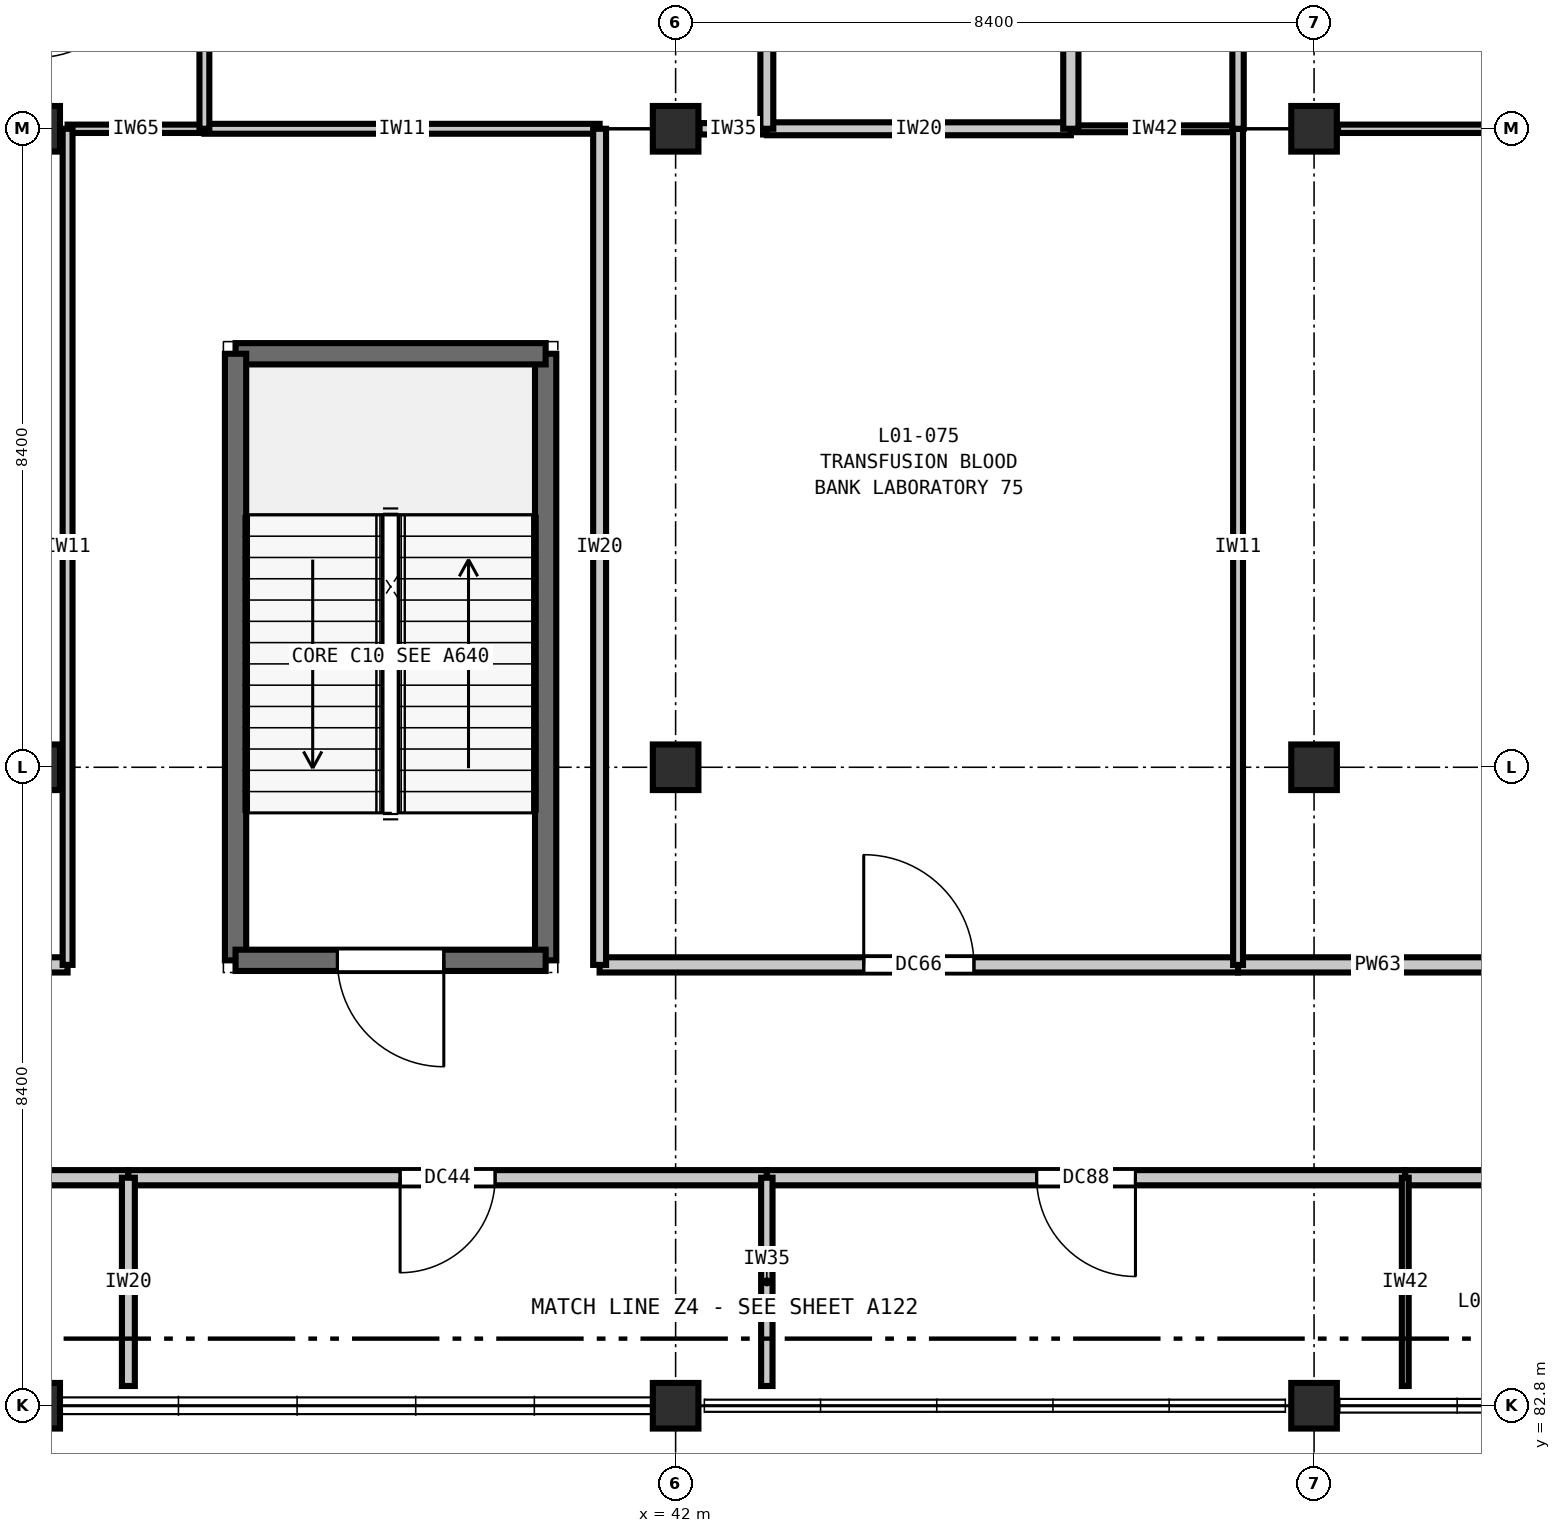
"""IFC4 building model, lengths in metres.
Left out: names, types, materials, properties, quantities, classifications, styles, units other than length and angle.
Written with IfcOpenShell. Run it as: python <this file> out.ifc"""

import sys

from ifc_helpers import new_model, si_unit, direction, frame, frame_2d, origin, origin_2d, place, context, subcontext, project, spatial, rectangle, extrude, element, fill, save


model = new_model("IFC4")
c1 = context("Model", 3, precision=1e-05, world=origin(), true_north=direction((0.0, 1.0)))
c2 = subcontext(c1, "Body", "Model", "MODEL_VIEW")
j1 = project(units=[si_unit("LENGTHUNIT", "METRE"), si_unit("PLANEANGLEUNIT", "RADIAN")], contexts=[c1])
p1 = place(None, origin())
s1 = spatial("IfcSite", under=j1, at=p1, CompositionType="ELEMENT")
p2 = place(p1, origin())
s2 = spatial("IfcBuilding", under=s1, at=p2, CompositionType="ELEMENT")
p3 = place(p2, frame((0.0, 0.0, 5.4)))
s3 = spatial("IfcBuildingStorey", under=s2, at=p3, CompositionType="ELEMENT", Elevation=5.4)
for number, where, z_axis, x_axis in (
    (1, (33.6, 82.8, 0.0), (0.0, 0.0, 1.0), (1.0, 0.0, 0.0)),
    (2, (33.6, 91.2, 0.0), (0.0, 0.0, 1.0), (1.0, 0.0, 0.0)),
    (3, (33.6, 99.6, 0.0), (0.0, 0.0, 1.0), (1.0, 0.0, 0.0)),
    (4, (42.0, 82.8, 0.0), (0.0, 0.0, 1.0), (1.0, 0.0, 0.0)),
    (5, (42.0, 91.2, 0.0), (0.0, 0.0, 1.0), (1.0, 0.0, 0.0)),
    (6, (42.0, 99.6, 0.0), (0.0, 0.0, 1.0), (1.0, 0.0, 0.0)),
    (7, (50.4, 82.8, 0.0), (0.0, 0.0, 1.0), (1.0, 0.0, 0.0)),
    (8, (50.4, 91.2, 0.0), (0.0, 0.0, 1.0), (1.0, 0.0, 0.0)),
    (9, (50.4, 99.6, 0.0), (0.0, 0.0, 1.0), (1.0, 0.0, 0.0)),
):
    element("IfcColumn", number, at=place(p3, frame(where, z_axis=z_axis, x_axis=x_axis)), inside=s3, PredefinedType="COLUMN", context=c2, shape_type="SweptSolid", body=[
        extrude(rectangle(XDim=0.6, YDim=0.6, at=origin_2d()), origin(), (0.0, 0.0, 1.0), 5.4),
    ])
p4 = place(p3, frame((40.29, 88.66, 0.0), z_axis=(0.0, 0.0, 1.0), x_axis=(0.0, 1.0, 0.0)))
e10 = element("IfcWall", 10, at=p4, inside=s3, PredefinedType="SHEAR", context=c2, shape_type="SweptSolid", body=[
    extrude(rectangle(XDim=7.98, YDim=0.28, at=frame_2d((3.99, 0.0))), origin(), (0.0, 0.0, 1.0), 5.4),
])
p5 = place(p3, frame((40.29, 96.64, 0.0), z_axis=(0.0, 0.0, 1.0), x_axis=(-1.0, 0.0, 0.0)))
e11 = element("IfcWall", 11, at=p5, inside=s3, PredefinedType="SHEAR", context=c2, shape_type="SweptSolid", body=[
    extrude(rectangle(XDim=4.08, YDim=0.28, at=frame_2d((2.04, 0.0))), origin(), (0.0, 0.0, 1.0), 5.4),
])
p6 = place(p3, frame((36.21, 96.64, 0.0), z_axis=(0.0, 0.0, 1.0), x_axis=(0.0, -1.0, 0.0)))
e12 = element("IfcWall", 12, at=p6, inside=s3, PredefinedType="SHEAR", context=c2, shape_type="SweptSolid", body=[
    extrude(rectangle(XDim=7.98, YDim=0.28, at=frame_2d((3.99, 0.0))), origin(), (0.0, 0.0, 1.0), 5.4),
])
p7 = place(p3, frame((36.21, 88.66, 0.0), z_axis=(0.0, 0.0, 1.0), x_axis=(1.0, 0.0, 0.0)))
e13 = element("IfcWall", 13, at=p7, inside=s3, PredefinedType="SHEAR", context=c2, shape_type="SweptSolid", body=[
    extrude(rectangle(XDim=4.08, YDim=0.28, at=frame_2d((2.04, 0.0))), origin(), (0.0, 0.0, 1.0), 5.4),
])
p8 = place(p7, frame((1.34, 0.0, 0.0)))
e14 = element("IfcOpeningElement", 14, at=p8, cuts=e13, PredefinedType="OPENING", context=c2, shape_type="SweptSolid", body=[
    extrude(rectangle(XDim=1.4, YDim=2.2, at=frame_2d((0.7, 1.1))), frame((0.0, 0.15, 0.0), z_axis=(0.0, -1.0, 0.0), x_axis=(1.0, 0.0, 0.0)), (0.0, 0.0, 1.0), 0.3),
])
p9 = place(p3, frame((25.2, 85.8, 0.0), z_axis=(0.0, 0.0, 1.0), x_axis=(1.0, 0.0, 0.0)))
e15 = element("IfcWall", 15, at=p9, inside=s3, PredefinedType="PARTITIONING", context=c2, shape_type="SweptSolid", body=[
    extrude(rectangle(XDim=9.6, YDim=0.2, at=frame_2d((4.8, 0.0))), origin(), (0.0, 0.0, 1.0), 5.05),
])
p10 = place(p9, frame((3.875, 0.0, 0.0)))
e16 = element("IfcOpeningElement", 16, at=p10, cuts=e15, PredefinedType="OPENING", context=c2, shape_type="SweptSolid", body=[
    extrude(rectangle(XDim=1.85, YDim=2.3, at=frame_2d((0.925, 1.15))), frame((0.0, 0.11, 0.0), z_axis=(0.0, -1.0, 0.0), x_axis=(1.0, 0.0, 0.0)), (0.0, 0.0, 1.0), 0.22),
])
p11 = place(p3, frame((34.8, 85.8, 0.0), z_axis=(0.0, 0.0, 1.0), x_axis=(1.0, 0.0, 0.0)))
e17 = element("IfcWall", 17, at=p11, inside=s3, PredefinedType="PARTITIONING", context=c2, shape_type="SweptSolid", body=[
    extrude(rectangle(XDim=8.4, YDim=0.2, at=frame_2d((4.2, 0.0))), origin(), (0.0, 0.0, 1.0), 5.05),
])
p12 = place(p11, frame((3.575, 0.0, 0.0)))
e18 = element("IfcOpeningElement", 18, at=p12, cuts=e17, PredefinedType="OPENING", context=c2, shape_type="SweptSolid", body=[
    extrude(rectangle(XDim=1.25, YDim=2.15, at=frame_2d((0.625, 1.075))), frame((0.0, 0.11, 0.0), z_axis=(0.0, -1.0, 0.0), x_axis=(1.0, 0.0, 0.0)), (0.0, 0.0, 1.0), 0.22),
])
p13 = place(p3, frame((43.2, 85.8, 0.0), z_axis=(0.0, 0.0, 1.0), x_axis=(1.0, 0.0, 0.0)))
e19 = element("IfcWall", 19, at=p13, inside=s3, PredefinedType="PARTITIONING", context=c2, shape_type="SweptSolid", body=[
    extrude(rectangle(XDim=8.4, YDim=0.2, at=frame_2d((4.2, 0.0))), origin(), (0.0, 0.0, 1.0), 5.05),
])
p14 = place(p13, frame((3.55, 0.0, 0.0)))
e20 = element("IfcOpeningElement", 20, at=p14, cuts=e19, PredefinedType="OPENING", context=c2, shape_type="SweptSolid", body=[
    extrude(rectangle(XDim=1.3, YDim=2.2, at=frame_2d((0.65, 1.1))), frame((0.0, 0.11, 0.0), z_axis=(0.0, -1.0, 0.0), x_axis=(1.0, 0.0, 0.0)), (0.0, 0.0, 1.0), 0.22),
])
p15 = place(p3, frame((51.6, 85.8, 0.0), z_axis=(0.0, 0.0, 1.0), x_axis=(1.0, 0.0, 0.0)))
e21 = element("IfcWall", 21, at=p15, inside=s3, PredefinedType="PARTITIONING", context=c2, shape_type="SweptSolid", body=[
    extrude(rectangle(XDim=7.2, YDim=0.2, at=frame_2d((3.6, 0.0))), origin(), (0.0, 0.0, 1.0), 5.05),
])
p16 = place(p15, frame((2.925, 0.0, 0.0)))
e22 = element("IfcOpeningElement", 22, at=p16, cuts=e21, PredefinedType="OPENING", context=c2, shape_type="SweptSolid", body=[
    extrude(rectangle(XDim=1.35, YDim=2.2, at=frame_2d((0.675, 1.1))), frame((0.0, 0.11, 0.0), z_axis=(0.0, -1.0, 0.0), x_axis=(1.0, 0.0, 0.0)), (0.0, 0.0, 1.0), 0.22),
])
p17 = place(p3, frame((25.6, 88.6, 0.0), z_axis=(0.0, 0.0, 1.0), x_axis=(1.0, 0.0, 0.0)))
e23 = element("IfcWall", 23, at=p17, inside=s3, PredefinedType="PARTITIONING", context=c2, shape_type="SweptSolid", body=[
    extrude(rectangle(XDim=8.4, YDim=0.2, at=frame_2d((4.2, 0.0))), origin(), (0.0, 0.0, 1.0), 5.05),
])
p18 = place(p17, frame((3.525, 0.0, 0.0)))
e24 = element("IfcOpeningElement", 24, at=p18, cuts=e23, PredefinedType="OPENING", context=c2, shape_type="SweptSolid", body=[
    extrude(rectangle(XDim=1.35, YDim=2.2, at=frame_2d((0.675, 1.1))), frame((0.0, 0.11, 0.0), z_axis=(0.0, -1.0, 0.0), x_axis=(1.0, 0.0, 0.0)), (0.0, 0.0, 1.0), 0.22),
])
p19 = place(p3, frame((41.0, 88.6, 0.0), z_axis=(0.0, 0.0, 1.0), x_axis=(1.0, 0.0, 0.0)))
e25 = element("IfcWall", 25, at=p19, inside=s3, PredefinedType="PARTITIONING", context=c2, shape_type="SweptSolid", body=[
    extrude(rectangle(XDim=8.4, YDim=0.2, at=frame_2d((4.2, 0.0))), origin(), (0.0, 0.0, 1.0), 5.05),
])
p20 = place(p19, frame((3.475, 0.0, 0.0)))
e26 = element("IfcOpeningElement", 26, at=p20, cuts=e25, PredefinedType="OPENING", context=c2, shape_type="SweptSolid", body=[
    extrude(rectangle(XDim=1.45, YDim=2.25, at=frame_2d((0.725, 1.125))), frame((0.0, 0.11, 0.0), z_axis=(0.0, -1.0, 0.0), x_axis=(1.0, 0.0, 0.0)), (0.0, 0.0, 1.0), 0.22),
])
p21 = place(p3, frame((49.4, 88.6, 0.0), z_axis=(0.0, 0.0, 1.0), x_axis=(1.0, 0.0, 0.0)))
e27 = element("IfcWall", 27, at=p21, inside=s3, PredefinedType="PARTITIONING", context=c2, shape_type="SweptSolid", body=[
    extrude(rectangle(XDim=9.4, YDim=0.2, at=frame_2d((4.7, 0.0))), origin(), (0.0, 0.0, 1.0), 5.05),
])
p22 = place(p21, frame((3.925, 0.0, 0.0)))
e28 = element("IfcOpeningElement", 28, at=p22, cuts=e27, PredefinedType="OPENING", context=c2, shape_type="SweptSolid", body=[
    extrude(rectangle(XDim=1.55, YDim=2.25, at=frame_2d((0.775, 1.125))), frame((0.0, 0.11, 0.0), z_axis=(0.0, -1.0, 0.0), x_axis=(1.0, 0.0, 0.0)), (0.0, 0.0, 1.0), 0.22),
])
p23 = place(p3, frame((34.0, 99.6, 0.0), z_axis=(0.0, 0.0, 1.0), x_axis=(1.0, 0.0, 0.0)))
e29 = element("IfcWall", 29, at=p23, inside=s3, PredefinedType="PARTITIONING", context=c2, shape_type="SweptSolid", body=[
    extrude(rectangle(XDim=1.8, YDim=0.11, at=frame_2d((0.9, 0.0))), origin(), (0.0, 0.0, 1.0), 4.685),
])
p24 = place(p3, frame((35.8, 99.6, 0.0), z_axis=(0.0, 0.0, 1.0), x_axis=(1.0, 0.0, 0.0)))
e30 = element("IfcWall", 30, at=p24, inside=s3, PredefinedType="PARTITIONING", context=c2, shape_type="SweptSolid", body=[
    extrude(rectangle(XDim=5.2, YDim=0.13, at=frame_2d((2.6, 0.0))), origin(), (0.0, 0.0, 1.0), 4.685),
])
p25 = place(p3, frame((42.315, 99.6, 0.0), z_axis=(0.0, 0.0, 1.0), x_axis=(1.0, 0.0, 0.0)))
e31 = element("IfcWall", 31, at=p25, inside=s3, PredefinedType="PARTITIONING", context=c2, shape_type="SweptSolid", body=[
    extrude(rectangle(XDim=0.885, YDim=0.15, at=frame_2d((0.442, 0.0))), origin(), (0.0, 0.0, 1.0), 4.685),
])
p26 = place(p3, frame((43.2, 99.6, 0.0), z_axis=(0.0, 0.0, 1.0), x_axis=(1.0, 0.0, 0.0)))
e32 = element("IfcWall", 32, at=p26, inside=s3, PredefinedType="PARTITIONING", context=c2, shape_type="SweptSolid", body=[
    extrude(rectangle(XDim=4.0, YDim=0.17, at=frame_2d((2.0, 0.0))), origin(), (0.0, 0.0, 1.0), 4.685),
])
p27 = place(p3, frame((47.2, 99.6, 0.0), z_axis=(0.0, 0.0, 1.0), x_axis=(1.0, 0.0, 0.0)))
e33 = element("IfcWall", 33, at=p27, inside=s3, PredefinedType="PARTITIONING", context=c2, shape_type="SweptSolid", body=[
    extrude(rectangle(XDim=2.2, YDim=0.09, at=frame_2d((1.1, 0.0))), origin(), (0.0, 0.0, 1.0), 4.685),
])
p28 = place(p3, frame((50.715, 99.6, 0.0), z_axis=(0.0, 0.0, 1.0), x_axis=(1.0, 0.0, 0.0)))
e34 = element("IfcWall", 34, at=p28, inside=s3, PredefinedType="PARTITIONING", context=c2, shape_type="SweptSolid", body=[
    extrude(rectangle(XDim=6.085, YDim=0.11, at=frame_2d((3.042, 0.0))), origin(), (0.0, 0.0, 1.0), 4.685),
])
p29 = place(p3, frame((34.0, 88.6, 0.0), z_axis=(0.0, 0.0, 1.0), x_axis=(0.0, 1.0, 0.0)))
e35 = element("IfcWall", 35, at=p29, inside=s3, PredefinedType="PARTITIONING", context=c2, shape_type="SweptSolid", body=[
    extrude(rectangle(XDim=11.0, YDim=0.13, at=frame_2d((5.5, 0.0))), origin(), (0.0, 0.0, 1.0), 5.05),
])
p30 = place(p3, frame((34.8, 83.06, 0.0), z_axis=(0.0, 0.0, 1.0), x_axis=(0.0, 1.0, 0.0)))
e36 = element("IfcWall", 36, at=p30, inside=s3, PredefinedType="PARTITIONING", context=c2, shape_type="SweptSolid", body=[
    extrude(rectangle(XDim=2.74, YDim=0.17, at=frame_2d((1.37, 0.0))), origin(), (0.0, 0.0, 1.0), 5.05),
])
p31 = place(p3, frame((35.8, 99.6, 0.0), z_axis=(0.0, 0.0, 1.0), x_axis=(0.0, 1.0, 0.0)))
e37 = element("IfcWall", 37, at=p31, inside=s3, PredefinedType="PARTITIONING", context=c2, shape_type="SweptSolid", body=[
    extrude(rectangle(XDim=6.8, YDim=0.13, at=frame_2d((3.4, 0.0))), origin(), (0.0, 0.0, 1.0), 5.05),
])
p32 = place(p3, frame((41.0, 88.6, 0.0), z_axis=(0.0, 0.0, 1.0), x_axis=(0.0, 1.0, 0.0)))
e38 = element("IfcWall", 38, at=p32, inside=s3, PredefinedType="PARTITIONING", context=c2, shape_type="SweptSolid", body=[
    extrude(rectangle(XDim=11.0, YDim=0.17, at=frame_2d((5.5, 0.0))), origin(), (0.0, 0.0, 1.0), 5.05),
])
p33 = place(p3, frame((43.2, 83.06, 0.0), z_axis=(0.0, 0.0, 1.0), x_axis=(0.0, 1.0, 0.0)))
e39 = element("IfcWall", 39, at=p33, inside=s3, PredefinedType="PARTITIONING", context=c2, shape_type="SweptSolid", body=[
    extrude(rectangle(XDim=2.74, YDim=0.15, at=frame_2d((1.37, 0.0))), origin(), (0.0, 0.0, 1.0), 5.05),
])
p34 = place(p3, frame((43.2, 99.6, 0.0), z_axis=(0.0, 0.0, 1.0), x_axis=(0.0, 1.0, 0.0)))
e40 = element("IfcWall", 40, at=p34, inside=s3, PredefinedType="PARTITIONING", context=c2, shape_type="SweptSolid", body=[
    extrude(rectangle(XDim=13.6, YDim=0.17, at=frame_2d((6.8, 0.0))), origin(), (0.0, 0.0, 1.0), 5.05),
])
p35 = place(p3, frame((47.2, 99.6, 0.0), z_axis=(0.0, 0.0, 1.0), x_axis=(0.0, 1.0, 0.0)))
e41 = element("IfcWall", 41, at=p35, inside=s3, PredefinedType="PARTITIONING", context=c2, shape_type="SweptSolid", body=[
    extrude(rectangle(XDim=6.8, YDim=0.2, at=frame_2d((3.4, 0.0))), origin(), (0.0, 0.0, 1.0), 5.05),
])
p36 = place(p35, frame((2.55, 0.0, 0.0)))
e42 = element("IfcOpeningElement", 42, at=p36, cuts=e41, PredefinedType="OPENING", context=c2, shape_type="SweptSolid", body=[
    extrude(rectangle(XDim=1.7, YDim=2.3, at=frame_2d((0.85, 1.15))), frame((0.0, 0.11, 0.0), z_axis=(0.0, -1.0, 0.0), x_axis=(1.0, 0.0, 0.0)), (0.0, 0.0, 1.0), 0.22),
])
p37 = place(p3, frame((49.4, 88.6, 0.0), z_axis=(0.0, 0.0, 1.0), x_axis=(0.0, 1.0, 0.0)))
e43 = element("IfcWall", 43, at=p37, inside=s3, PredefinedType="PARTITIONING", context=c2, shape_type="SweptSolid", body=[
    extrude(rectangle(XDim=11.0, YDim=0.13, at=frame_2d((5.5, 0.0))), origin(), (0.0, 0.0, 1.0), 5.05),
])
p38 = place(p3, frame((49.4, 99.6, 0.0), z_axis=(0.0, 0.0, 1.0), x_axis=(0.0, 1.0, 0.0)))
e44 = element("IfcWall", 44, at=p38, inside=s3, PredefinedType="PARTITIONING", context=c2, shape_type="SweptSolid", body=[
    extrude(rectangle(XDim=6.8, YDim=0.15, at=frame_2d((3.4, 0.0))), origin(), (0.0, 0.0, 1.0), 5.05),
])
p39 = place(p3, frame((51.6, 83.06, 0.0), z_axis=(0.0, 0.0, 1.0), x_axis=(0.0, 1.0, 0.0)))
e45 = element("IfcWall", 45, at=p39, inside=s3, PredefinedType="PARTITIONING", context=c2, shape_type="SweptSolid", body=[
    extrude(rectangle(XDim=2.74, YDim=0.09, at=frame_2d((1.37, 0.0))), origin(), (0.0, 0.0, 1.0), 5.05),
])
p40 = place(p8, frame((1.4, 0.0, 0.0), z_axis=(0.0, 0.0, 1.0), x_axis=(-1.0, 0.0, 0.0)))
e46 = element("IfcDoor", 46, at=p40, inside=s3, OperationType="SINGLE_SWING_LEFT", PredefinedType="DOOR", context=c2, shape_type="SweptSolid", body=[
    extrude(rectangle(XDim=1.4, YDim=2.2, at=frame_2d((0.7, 1.1))), frame((0.0, 0.025, 0.0), z_axis=(0.0, -1.0, 0.0), x_axis=(1.0, 0.0, 0.0)), (0.0, 0.0, 1.0), 0.05),
])
fill(e14, e46)
p41 = place(p12, frame((1.25, 0.0, 0.0), z_axis=(0.0, 0.0, 1.0), x_axis=(-1.0, 0.0, 0.0)))
e47 = element("IfcDoor", 47, at=p41, inside=s3, OperationType="SINGLE_SWING_RIGHT", PredefinedType="DOOR", context=c2, shape_type="SweptSolid", body=[
    extrude(rectangle(XDim=1.25, YDim=2.15, at=frame_2d((0.625, 1.075))), frame((0.0, 0.025, 0.0), z_axis=(0.0, -1.0, 0.0), x_axis=(1.0, 0.0, 0.0)), (0.0, 0.0, 1.0), 0.05),
])
fill(e18, e47)
p42 = place(p14, frame((1.3, 0.0, 0.0), z_axis=(0.0, 0.0, 1.0), x_axis=(-1.0, 0.0, 0.0)))
e48 = element("IfcDoor", 48, at=p42, inside=s3, OperationType="SINGLE_SWING_LEFT", PredefinedType="DOOR", context=c2, shape_type="SweptSolid", body=[
    extrude(rectangle(XDim=1.3, YDim=2.2, at=frame_2d((0.65, 1.1))), frame((0.0, 0.025, 0.0), z_axis=(0.0, -1.0, 0.0), x_axis=(1.0, 0.0, 0.0)), (0.0, 0.0, 1.0), 0.05),
])
fill(e20, e48)
p43 = place(p20, origin())
e49 = element("IfcDoor", 49, at=p43, inside=s3, OperationType="SINGLE_SWING_LEFT", PredefinedType="DOOR", context=c2, shape_type="SweptSolid", body=[
    extrude(rectangle(XDim=1.45, YDim=2.25, at=frame_2d((0.725, 1.125))), frame((0.0, 0.025, 0.0), z_axis=(0.0, -1.0, 0.0), x_axis=(1.0, 0.0, 0.0)), (0.0, 0.0, 1.0), 0.05),
])
fill(e26, e49)
save(model, sys.argv[1])
